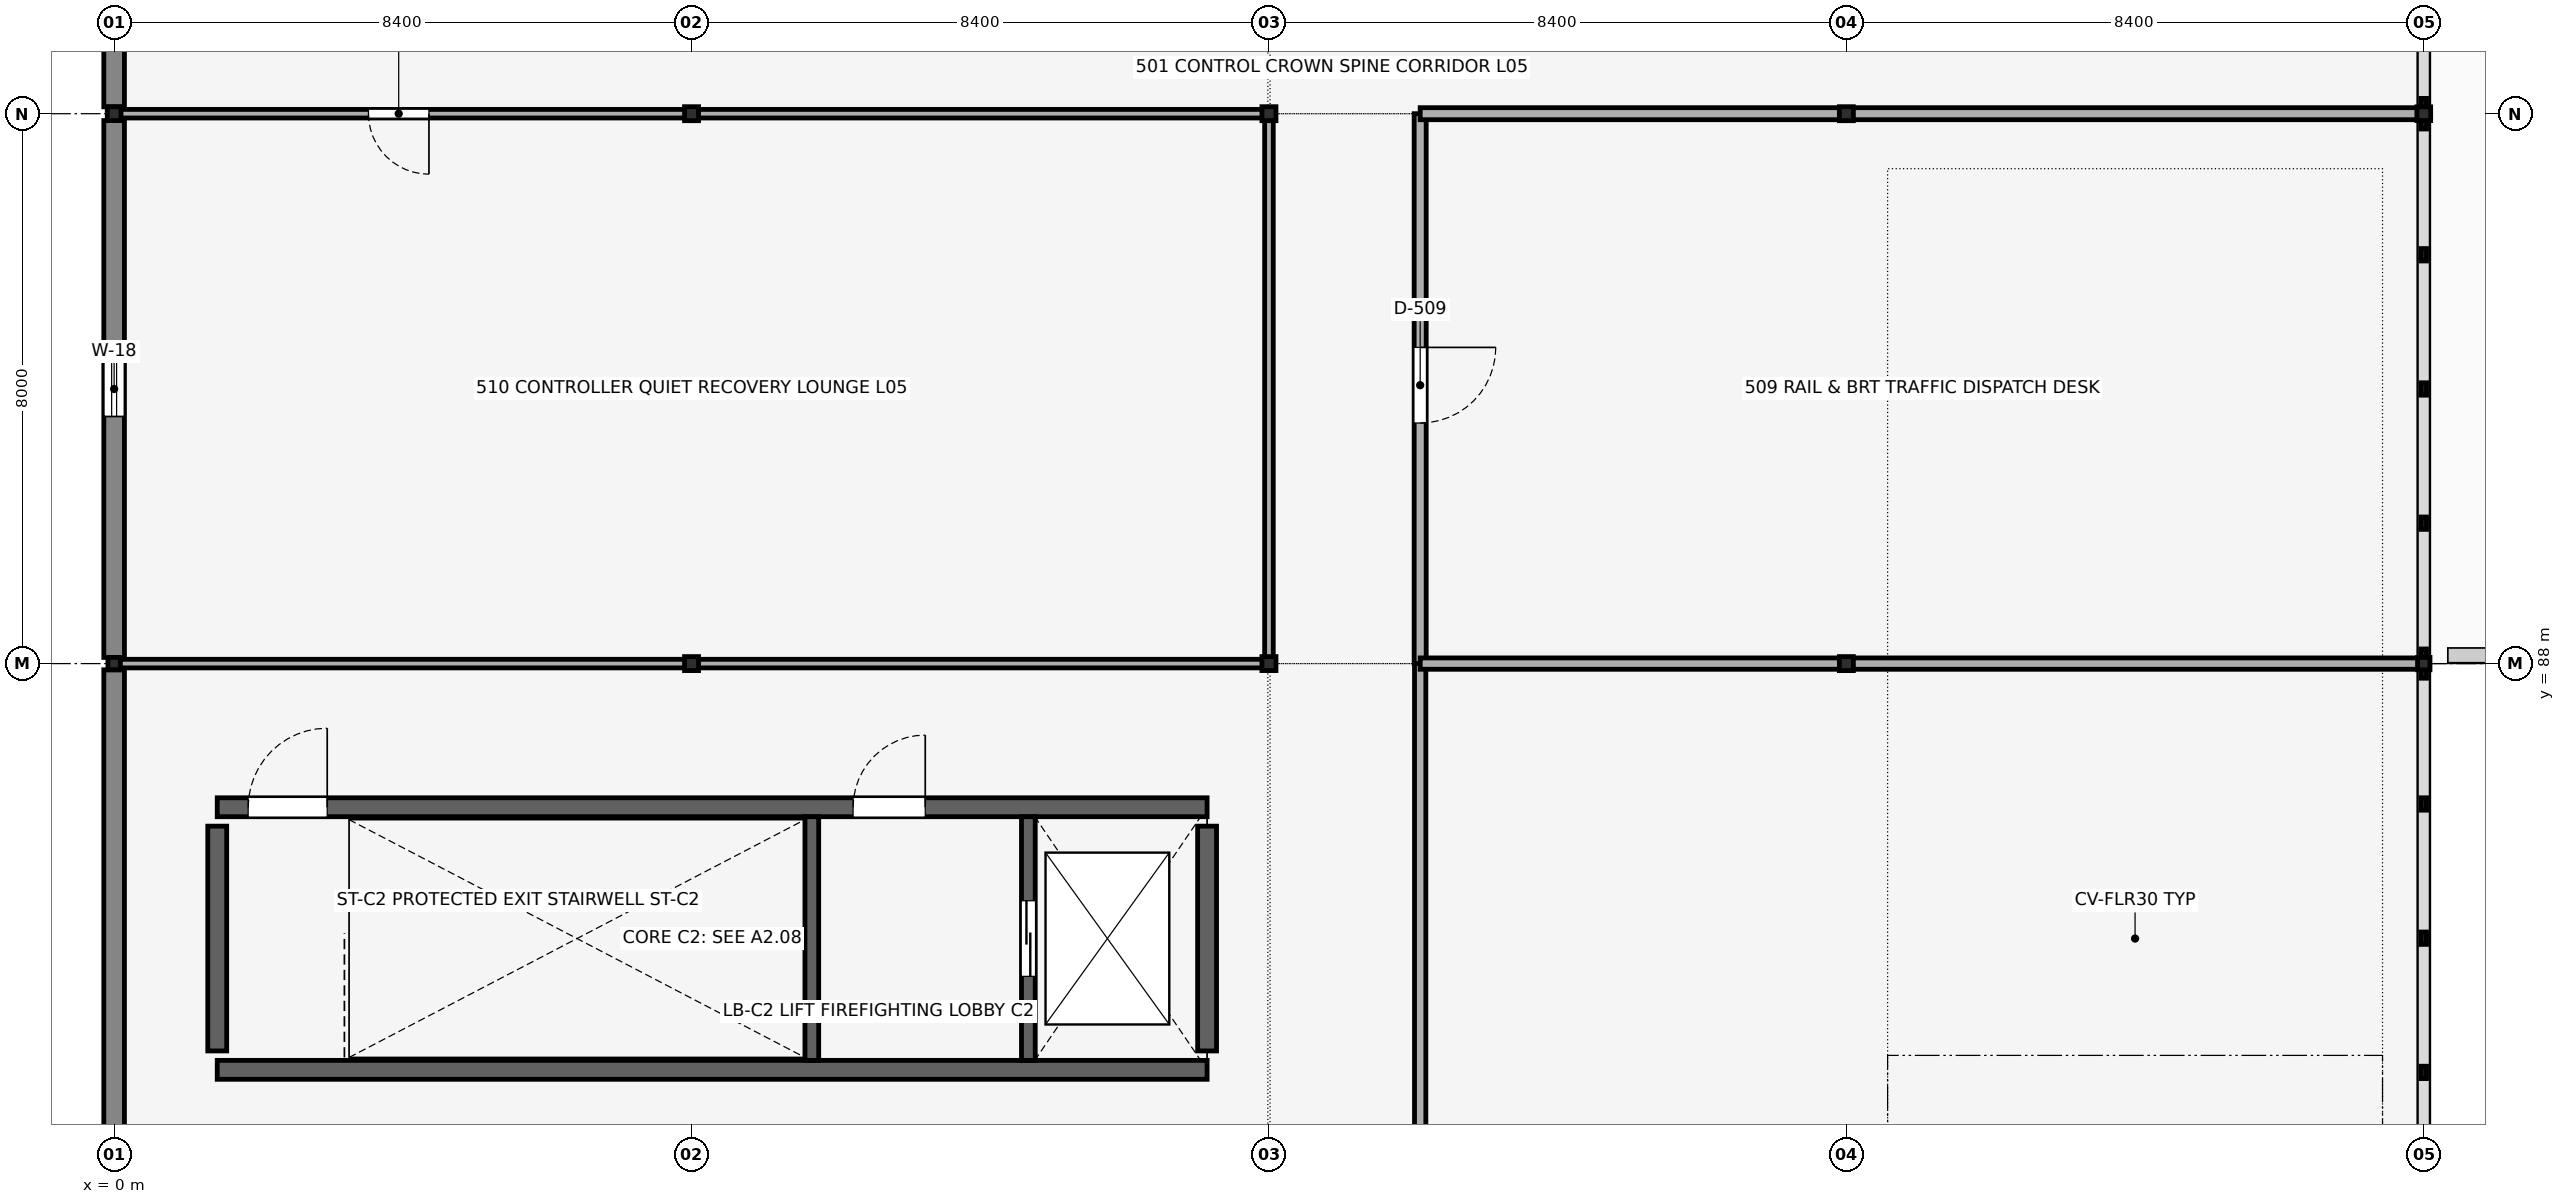
"""IFC4 building model, lengths in metres.
Left out: names, types, materials, properties, quantities, classifications, styles, units other than length and angle.
Written with IfcOpenShell. Run it as: python <this file> out.ifc"""

import sys

from ifc_helpers import new_model, si_unit, direction, frame, frame_2d, origin, origin_2d, place, context, subcontext, project, spatial, rectangle, hollow_rectangle, i_section, extrude, element, fill, save


model = new_model("IFC4")
c1 = context("Model", 3, precision=1e-05, world=origin(), true_north=direction((0.0, 1.0)))
c2 = subcontext(c1, "Body", "Model", "MODEL_VIEW")
j1 = project(units=[si_unit("LENGTHUNIT", "METRE"), si_unit("PLANEANGLEUNIT", "RADIAN")], contexts=[c1])
p1 = place(None, origin())
s1 = spatial("IfcSite", under=j1, at=p1, CompositionType="ELEMENT")
p2 = place(p1, origin())
s2 = spatial("IfcBuilding", under=s1, at=p2, CompositionType="ELEMENT")
p3 = place(p2, frame((0.0, 0.0, 21.04)))
s3 = spatial("IfcBuildingStorey", under=s2, at=p3, CompositionType="ELEMENT", Elevation=21.04)
p4 = place(p3, frame((1.5, 82.09, 0.0), z_axis=(0.0, 0.0, 1.0), x_axis=(1.0, 0.0, 0.0)))
e1 = element("IfcWall", 1, at=p4, inside=s3, PredefinedType="SHEAR", context=c2, shape_type="SweptSolid", body=[
    extrude(rectangle(XDim=14.4, YDim=0.275, at=frame_2d((7.2, 0.0))), origin(), (0.0, 0.0, 1.0), 3.92),
])
p5 = place(p3, frame((1.5, 85.91, 0.0), z_axis=(0.0, 0.0, 1.0), x_axis=(1.0, 0.0, 0.0)))
e2 = element("IfcWall", 2, at=p5, inside=s3, PredefinedType="SHEAR", context=c2, shape_type="SweptSolid", body=[
    extrude(rectangle(XDim=14.4, YDim=0.275, at=frame_2d((7.2, 0.0))), origin(), (0.0, 0.0, 1.0), 3.92),
])
p6 = place(p5, frame((0.45, 0.0, 0.0), z_axis=(0.0, 0.0, 1.0), x_axis=(1.0, 0.0, 0.0)))
e3 = element("IfcOpeningElement", 3, at=p6, cuts=e2, PredefinedType="OPENING", context=c2, shape_type="SweptSolid", body=[
    extrude(rectangle(XDim=1.15, YDim=2.15, at=frame_2d((0.575, 1.075))), frame((0.0, 0.147, 0.0), z_axis=(0.0, -1.0, 0.0), x_axis=(1.0, 0.0, 0.0)), (0.0, 0.0, 1.0), 0.295),
])
p7 = place(p5, frame((9.25, 0.0, 0.0), z_axis=(0.0, 0.0, 1.0), x_axis=(1.0, 0.0, 0.0)))
e4 = element("IfcOpeningElement", 4, at=p7, cuts=e2, PredefinedType="OPENING", context=c2, shape_type="SweptSolid", body=[
    extrude(rectangle(XDim=1.05, YDim=2.15, at=frame_2d((0.525, 1.075))), frame((0.0, 0.147, 0.0), z_axis=(0.0, -1.0, 0.0), x_axis=(1.0, 0.0, 0.0)), (0.0, 0.0, 1.0), 0.295),
])
for number, where, z_axis, x_axis in (
    (5, (1.5, 82.365, 0.0), (0.0, 0.0, 1.0), (0.0, 1.0, 0.0)),
    (6, (15.9, 82.365, 0.0), (0.0, 0.0, 1.0), (0.0, 1.0, 0.0)),
):
    element("IfcWall", number, at=place(p3, frame(where, z_axis=z_axis, x_axis=x_axis)), inside=s3, PredefinedType="SHEAR", context=c2, shape_type="SweptSolid", body=[
        extrude(rectangle(XDim=3.27, YDim=0.275, at=frame_2d((1.635, 0.0))), origin(), (0.0, 0.0, 1.0), 3.92),
    ])
p8 = place(p3, frame((0.0, 88.0, 0.0), z_axis=(0.0, 0.0, 1.0), x_axis=(1.0, 0.0, 0.0)))
e7 = element("IfcColumn", 7, at=p8, inside=s3, PredefinedType="COLUMN", context=c2, shape_type="SweptSolid", body=[
    extrude(hollow_rectangle(XDim=0.18, YDim=0.18, WallThickness=0.008, InnerFilletRadius=0.012, OuterFilletRadius=0.02, at=origin_2d()), origin(), (0.0, 0.0, 1.0), 3.92),
])
p9 = place(p3, frame((0.0, 96.0, 0.0), z_axis=(0.0, 0.0, 1.0), x_axis=(1.0, 0.0, 0.0)))
e8 = element("IfcColumn", 8, at=p9, inside=s3, PredefinedType="COLUMN", context=c2, shape_type="SweptSolid", body=[
    extrude(hollow_rectangle(XDim=0.2, YDim=0.2, WallThickness=0.01, InnerFilletRadius=0.015, OuterFilletRadius=0.025, at=origin_2d()), origin(), (0.0, 0.0, 1.0), 3.92),
])
for number, where, z_axis, x_axis in (
    (9, (8.4, 88.0, 0.0), (0.0, 0.0, 1.0), (1.0, 0.0, 0.0)),
    (10, (8.4, 96.0, 0.0), (0.0, 0.0, 1.0), (1.0, 0.0, 0.0)),
):
    element("IfcColumn", number, at=place(p3, frame(where, z_axis=z_axis, x_axis=x_axis)), inside=s3, PredefinedType="COLUMN", context=c2, shape_type="SweptSolid", body=[
        extrude(i_section(OverallWidth=0.204, OverallDepth=0.203, WebThickness=0.007, FlangeThickness=0.011, FilletRadius=0.01, at=origin_2d()), origin(), (0.0, 0.0, 1.0), 4.82),
    ])
for number, where, z_axis, x_axis in (
    (11, (16.8, 88.0, 0.0), (0.0, 0.0, 1.0), (1.0, 0.0, 0.0)),
    (12, (16.8, 96.0, 0.0), (0.0, 0.0, 1.0), (1.0, 0.0, 0.0)),
):
    element("IfcColumn", number, at=place(p3, frame(where, z_axis=z_axis, x_axis=x_axis)), inside=s3, PredefinedType="COLUMN", context=c2, shape_type="SweptSolid", body=[
        extrude(i_section(OverallWidth=0.204, OverallDepth=0.203, WebThickness=0.007, FlangeThickness=0.011, FilletRadius=0.01, at=origin_2d()), origin(), (0.0, 0.0, 1.0), 5.72),
    ])
for number, where, z_axis, x_axis in (
    (13, (25.2, 88.0, 0.0), (0.0, 0.0, 1.0), (1.0, 0.0, 0.0)),
    (14, (25.2, 96.0, 0.0), (0.0, 0.0, 1.0), (1.0, 0.0, 0.0)),
):
    element("IfcColumn", number, at=place(p3, frame(where, z_axis=z_axis, x_axis=x_axis)), inside=s3, PredefinedType="COLUMN", context=c2, shape_type="SweptSolid", body=[
        extrude(i_section(OverallWidth=0.204, OverallDepth=0.203, WebThickness=0.007, FlangeThickness=0.011, FilletRadius=0.01, at=origin_2d()), origin(), (0.0, 0.0, 1.0), 4.82),
    ])
p10 = place(p3, frame((33.6, 88.0, 0.0), z_axis=(0.0, 0.0, 1.0), x_axis=(1.0, 0.0, 0.0)))
e15 = element("IfcColumn", 15, at=p10, inside=s3, PredefinedType="COLUMN", context=c2, shape_type="SweptSolid", body=[
    extrude(hollow_rectangle(XDim=0.18, YDim=0.18, WallThickness=0.008, InnerFilletRadius=0.012, OuterFilletRadius=0.02, at=origin_2d()), origin(), (0.0, 0.0, 1.0), 3.92),
])
p11 = place(p3, frame((33.6, 96.0, 0.0), z_axis=(0.0, 0.0, 1.0), x_axis=(1.0, 0.0, 0.0)))
e16 = element("IfcColumn", 16, at=p11, inside=s3, PredefinedType="COLUMN", context=c2, shape_type="SweptSolid", body=[
    extrude(hollow_rectangle(XDim=0.2, YDim=0.2, WallThickness=0.01, InnerFilletRadius=0.015, OuterFilletRadius=0.025, at=origin_2d()), origin(), (0.0, 0.0, 1.0), 3.92),
])
p12 = place(p3, frame((0.0, 80.1, 0.0), z_axis=(0.0, 0.0, 1.0), x_axis=(0.0, 1.0, 0.0)))
e17 = element("IfcWall", 17, at=p12, inside=s3, PredefinedType="SOLIDWALL", context=c2, shape_type="SweptSolid", body=[
    extrude(rectangle(XDim=7.81, YDim=0.3, at=frame_2d((3.905, 0.0))), origin(), (0.0, 0.0, 1.0), 3.62),
])
p13 = place(p3, frame((0.0, 88.09, 0.0), z_axis=(0.0, 0.0, 1.0), x_axis=(0.0, 1.0, 0.0)))
e18 = element("IfcWall", 18, at=p13, inside=s3, PredefinedType="SOLIDWALL", context=c2, shape_type="SweptSolid", body=[
    extrude(rectangle(XDim=7.81, YDim=0.3, at=frame_2d((3.905, 0.0))), origin(), (0.0, 0.0, 1.0), 3.62),
])
p14 = place(p13, frame((3.505, 0.0, 0.65), z_axis=(0.0, 0.0, 1.0), x_axis=(1.0, 0.0, 0.0)))
e19 = element("IfcOpeningElement", 19, at=p14, cuts=e18, PredefinedType="OPENING", context=c2, shape_type="SweptSolid", body=[
    extrude(rectangle(XDim=0.8, YDim=1.85, at=frame_2d((0.4, 0.925))), frame((0.0, 0.16, 0.0), z_axis=(0.0, -1.0, 0.0), x_axis=(1.0, 0.0, 0.0)), (0.0, 0.0, 1.0), 0.32),
])
p15 = place(p3, frame((0.0, 96.1, 0.0), z_axis=(0.0, 0.0, 1.0), x_axis=(0.0, 1.0, 0.0)))
e20 = element("IfcWall", 20, at=p15, inside=s3, PredefinedType="SOLIDWALL", context=c2, shape_type="SweptSolid", body=[
    extrude(rectangle(XDim=7.8, YDim=0.3, at=frame_2d((3.9, 0.0))), origin(), (0.0, 0.0, 1.0), 3.62),
])
p16 = place(p15, frame((3.3, 0.0, 1.55), z_axis=(0.0, 0.0, 1.0), x_axis=(1.0, 0.0, 0.0)))
e21 = element("IfcOpeningElement", 21, at=p16, cuts=e20, PredefinedType="OPENING", context=c2, shape_type="SweptSolid", body=[
    extrude(rectangle(XDim=1.2, YDim=0.95, at=frame_2d((0.6, 0.475))), frame((0.0, 0.16, 0.0), z_axis=(0.0, -1.0, 0.0), x_axis=(1.0, 0.0, 0.0)), (0.0, 0.0, 1.0), 0.32),
])
p17 = place(p3, frame((50.28, 88.12, 0.0), z_axis=(0.0, 0.0, 1.0), x_axis=(-1.0, 0.0, 0.0)))
e22 = element("IfcWall", 22, at=p17, inside=s3, PredefinedType="PARAPET", context=c2, shape_type="SweptSolid", body=[
    extrude(rectangle(XDim=16.33, YDim=0.215, at=frame_2d((8.165, 0.0))), origin(), (0.0, 0.0, 1.0), 1.05),
])
p18 = place(p3, frame((10.15, 82.228, 0.0), z_axis=(0.0, 0.0, 1.0), x_axis=(0.0, 1.0, 0.0)))
e23 = element("IfcWall", 23, at=p18, inside=s3, PredefinedType="SHEAR", context=c2, shape_type="SweptSolid", body=[
    extrude(rectangle(XDim=3.545, YDim=0.2, at=frame_2d((1.772, 0.0))), origin(), (0.0, 0.0, 1.0), 3.92),
])
p19 = place(p3, frame((13.3, 82.228, 0.0), z_axis=(0.0, 0.0, 1.0), x_axis=(0.0, 1.0, 0.0)))
e24 = element("IfcWall", 24, at=p19, inside=s3, PredefinedType="SHEAR", context=c2, shape_type="SweptSolid", body=[
    extrude(rectangle(XDim=3.545, YDim=0.2, at=frame_2d((1.772, 0.0))), origin(), (0.0, 0.0, 1.0), 3.92),
])
p20 = place(p19, frame((1.222, 0.0, 0.0), z_axis=(0.0, 0.0, 1.0), x_axis=(1.0, 0.0, 0.0)))
e25 = element("IfcOpeningElement", 25, at=p20, cuts=e24, PredefinedType="OPENING", context=c2, shape_type="SweptSolid", body=[
    extrude(rectangle(XDim=1.1, YDim=2.15, at=frame_2d((0.55, 1.075))), frame((0.0, 0.11, 0.0), z_axis=(0.0, -1.0, 0.0), x_axis=(1.0, 0.0, 0.0)), (0.0, 0.0, 1.0), 0.22),
])
p21 = place(p3, frame((19.0, 72.0, 0.0), z_axis=(0.0, 0.0, 1.0), x_axis=(0.0, 1.0, 0.0)))
e26 = element("IfcWall", 26, at=p21, inside=s3, PredefinedType="PARTITIONING", context=c2, shape_type="SweptSolid", body=[
    extrude(rectangle(XDim=16.0, YDim=0.165, at=frame_2d((8.0, 0.0))), origin(), (0.0, 0.0, 1.0), 3.92),
])
p22 = place(p21, frame((4.68, 0.0, 0.0), z_axis=(0.0, 0.0, 1.0), x_axis=(-1.0, 0.0, 0.0)))
e27 = element("IfcOpeningElement", 27, at=p22, cuts=e26, PredefinedType="OPENING", context=c2, shape_type="SweptSolid", body=[
    extrude(rectangle(XDim=1.18, YDim=2.22, at=frame_2d((0.59, 1.11))), frame((0.0, 0.093, 0.0), z_axis=(0.0, -1.0, 0.0), x_axis=(1.0, 0.0, 0.0)), (0.0, 0.0, 1.0), 0.185),
])
p23 = place(p3, frame((19.0, 88.0, 0.0), z_axis=(0.0, 0.0, 1.0), x_axis=(0.0, 1.0, 0.0)))
e28 = element("IfcWall", 28, at=p23, inside=s3, PredefinedType="PARTITIONING", context=c2, shape_type="SweptSolid", body=[
    extrude(rectangle(XDim=8.0, YDim=0.175, at=frame_2d((4.0, 0.0))), origin(), (0.0, 0.0, 1.0), 3.92),
])
p24 = place(p23, frame((4.6, 0.0, 0.0), z_axis=(0.0, 0.0, 1.0), x_axis=(-1.0, 0.0, 0.0)))
e29 = element("IfcOpeningElement", 29, at=p24, cuts=e28, PredefinedType="OPENING", context=c2, shape_type="SweptSolid", body=[
    extrude(rectangle(XDim=1.1, YDim=2.2, at=frame_2d((0.55, 1.1))), frame((0.0, 0.097, 0.0), z_axis=(0.0, -1.0, 0.0), x_axis=(1.0, 0.0, 0.0)), (0.0, 0.0, 1.0), 0.195),
])
p25 = place(p3, frame((0.09, 96.0, 0.0), z_axis=(0.0, 0.0, 1.0), x_axis=(1.0, 0.0, 0.0)))
e30 = element("IfcWall", 30, at=p25, inside=s3, PredefinedType="PARTITIONING", context=c2, shape_type="SweptSolid", body=[
    extrude(rectangle(XDim=8.218, YDim=0.125, at=frame_2d((4.109, 0.0))), origin(), (0.0, 0.0, 1.0), 3.92),
])
p26 = place(p25, frame((4.49, 0.0, 0.0), z_axis=(0.0, 0.0, 1.0), x_axis=(-1.0, 0.0, 0.0)))
e31 = element("IfcOpeningElement", 31, at=p26, cuts=e30, PredefinedType="OPENING", context=c2, shape_type="SweptSolid", body=[
    extrude(rectangle(XDim=0.88, YDim=2.1, at=frame_2d((0.44, 1.05))), frame((0.0, 0.073, 0.0), z_axis=(0.0, -1.0, 0.0), x_axis=(1.0, 0.0, 0.0)), (0.0, 0.0, 1.0), 0.145),
])
p27 = place(p3, frame((19.0, 88.0, 0.0), z_axis=(0.0, 0.0, 1.0), x_axis=(1.0, 0.0, 0.0)))
e32 = element("IfcWall", 32, at=p27, inside=s3, PredefinedType="PARTITIONING", context=c2, shape_type="SweptSolid", body=[
    extrude(rectangle(XDim=6.108, YDim=0.165, at=frame_2d((3.054, 0.0))), origin(), (0.0, 0.0, 1.0), 3.92),
])
p28 = place(p3, frame((25.292, 88.0, 0.0), z_axis=(0.0, 0.0, 1.0), x_axis=(1.0, 0.0, 0.0)))
e33 = element("IfcWall", 33, at=p28, inside=s3, PredefinedType="PARTITIONING", context=c2, shape_type="SweptSolid", body=[
    extrude(rectangle(XDim=8.228, YDim=0.165, at=frame_2d((4.114, 0.0))), origin(), (0.0, 0.0, 1.0), 3.92),
])
p29 = place(p3, frame((19.0, 96.0, 0.0), z_axis=(0.0, 0.0, 1.0), x_axis=(1.0, 0.0, 0.0)))
e34 = element("IfcWall", 34, at=p29, inside=s3, PredefinedType="PARTITIONING", context=c2, shape_type="SweptSolid", body=[
    extrude(rectangle(XDim=6.108, YDim=0.175, at=frame_2d((3.054, 0.0))), origin(), (0.0, 0.0, 1.0), 3.92),
])
p30 = place(p3, frame((25.292, 96.0, 0.0), z_axis=(0.0, 0.0, 1.0), x_axis=(1.0, 0.0, 0.0)))
e35 = element("IfcWall", 35, at=p30, inside=s3, PredefinedType="PARTITIONING", context=c2, shape_type="SweptSolid", body=[
    extrude(rectangle(XDim=8.218, YDim=0.175, at=frame_2d((4.109, 0.0))), origin(), (0.0, 0.0, 1.0), 3.92),
])
p31 = place(p3, frame((8.492, 96.0, 0.0), z_axis=(0.0, 0.0, 1.0), x_axis=(1.0, 0.0, 0.0)))
e36 = element("IfcWall", 36, at=p31, inside=s3, PredefinedType="PARTITIONING", context=c2, shape_type="SweptSolid", body=[
    extrude(rectangle(XDim=8.217, YDim=0.125, at=frame_2d((4.108, 0.0))), origin(), (0.0, 0.0, 1.0), 3.92),
])
p32 = place(p3, frame((0.08, 88.0, 0.0), z_axis=(0.0, 0.0, 1.0), x_axis=(1.0, 0.0, 0.0)))
e37 = element("IfcWall", 37, at=p32, inside=s3, PredefinedType="PARTITIONING", context=c2, shape_type="SweptSolid", body=[
    extrude(rectangle(XDim=8.228, YDim=0.125, at=frame_2d((4.114, 0.0))), origin(), (0.0, 0.0, 1.0), 3.92),
])
p33 = place(p3, frame((8.492, 88.0, 0.0), z_axis=(0.0, 0.0, 1.0), x_axis=(1.0, 0.0, 0.0)))
e38 = element("IfcWall", 38, at=p33, inside=s3, PredefinedType="PARTITIONING", context=c2, shape_type="SweptSolid", body=[
    extrude(rectangle(XDim=8.217, YDim=0.125, at=frame_2d((4.108, 0.0))), origin(), (0.0, 0.0, 1.0), 3.92),
])
p34 = place(p3, frame((16.8, 88.092, 0.0), z_axis=(0.0, 0.0, 1.0), x_axis=(0.0, 1.0, 0.0)))
e39 = element("IfcWall", 39, at=p34, inside=s3, PredefinedType="PARTITIONING", context=c2, shape_type="SweptSolid", body=[
    extrude(rectangle(XDim=7.817, YDim=0.125, at=frame_2d((3.908, 0.0))), origin(), (0.0, 0.0, 1.0), 3.92),
])
p35 = place(p14, origin())
e40 = element("IfcWindow", 40, at=p35, inside=s3, PartitioningType="SINGLE_PANEL", PredefinedType="WINDOW", context=c2, shape_type="SweptSolid", body=[
    extrude(rectangle(XDim=0.8, YDim=1.85, at=frame_2d((0.4, 0.925))), frame((0.0, 0.03, 0.0), z_axis=(0.0, -1.0, 0.0), x_axis=(1.0, 0.0, 0.0)), (0.0, 0.0, 1.0), 0.06),
])
fill(e19, e40)
p36 = place(p6, origin())
e41 = element("IfcDoor", 41, at=p36, inside=s3, OperationType="SINGLE_SWING_RIGHT", PredefinedType="DOOR", context=c2, shape_type="SweptSolid", body=[
    extrude(rectangle(XDim=1.15, YDim=2.15, at=frame_2d((0.575, 1.075))), frame((0.0, 0.025, 0.0), z_axis=(0.0, -1.0, 0.0), x_axis=(1.0, 0.0, 0.0)), (0.0, 0.0, 1.0), 0.05),
])
fill(e3, e41)
p37 = place(p7, origin())
e42 = element("IfcDoor", 42, at=p37, inside=s3, OperationType="SINGLE_SWING_RIGHT", PredefinedType="DOOR", context=c2, shape_type="SweptSolid", body=[
    extrude(rectangle(XDim=1.05, YDim=2.15, at=frame_2d((0.525, 1.075))), frame((0.0, 0.025, 0.0), z_axis=(0.0, -1.0, 0.0), x_axis=(1.0, 0.0, 0.0)), (0.0, 0.0, 1.0), 0.05),
])
fill(e4, e42)
p38 = place(p20, origin())
e43 = element("IfcDoor", 43, at=p38, inside=s3, OperationType="DOUBLE_DOOR_SLIDING", PredefinedType="DOOR", context=c2, shape_type="SweptSolid", body=[
    extrude(rectangle(XDim=1.1, YDim=2.15, at=frame_2d((0.55, 1.075))), frame((0.0, 0.025, 0.0), z_axis=(0.0, -1.0, 0.0), x_axis=(1.0, 0.0, 0.0)), (0.0, 0.0, 1.0), 0.05),
])
fill(e25, e43)
p39 = place(p24, origin())
e44 = element("IfcDoor", 44, at=p39, inside=s3, OperationType="SINGLE_SWING_LEFT", PredefinedType="DOOR", context=c2, shape_type="SweptSolid", body=[
    extrude(rectangle(XDim=1.1, YDim=2.2, at=frame_2d((0.55, 1.1))), frame((0.0, 0.025, 0.0), z_axis=(0.0, -1.0, 0.0), x_axis=(1.0, 0.0, 0.0)), (0.0, 0.0, 1.0), 0.05),
])
fill(e29, e44)
p40 = place(p26, origin())
e45 = element("IfcDoor", 45, at=p40, inside=s3, OperationType="SINGLE_SWING_LEFT", PredefinedType="DOOR", context=c2, shape_type="SweptSolid", body=[
    extrude(rectangle(XDim=0.88, YDim=2.1, at=frame_2d((0.44, 1.05))), frame((0.0, 0.025, 0.0), z_axis=(0.0, -1.0, 0.0), x_axis=(1.0, 0.0, 0.0)), (0.0, 0.0, 1.0), 0.05),
])
fill(e31, e45)
save(model, sys.argv[1])
